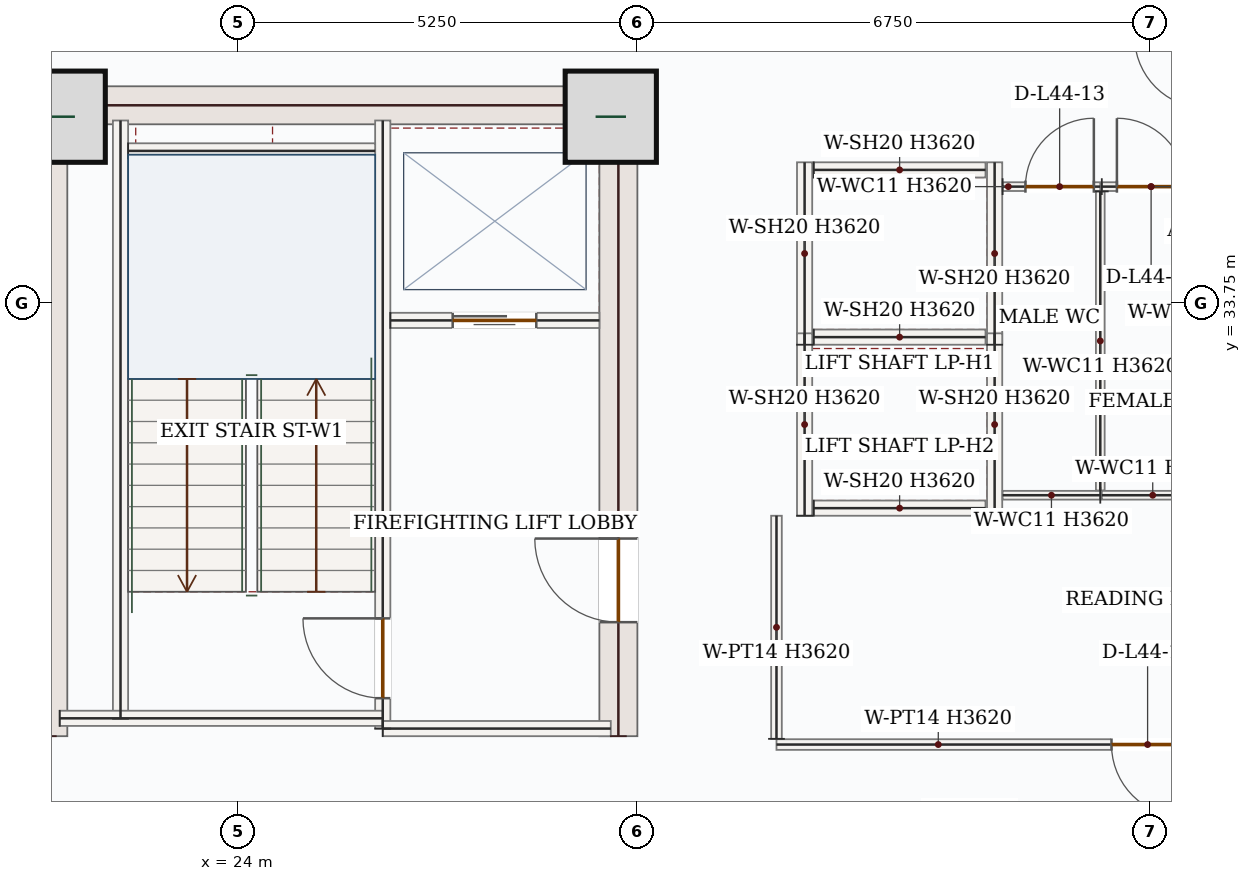
"""IFC4 building model, lengths in metres.
Left out: names, types, materials, properties, quantities, classifications, styles, units other than length and angle.
Written with IfcOpenShell. Run it as: python <this file> out.ifc"""

import sys

from ifc_helpers import new_model, si_unit, direction, frame, frame_2d, origin, origin_2d, place, context, subcontext, project, spatial, rectangle, extrude, source, transform, mapped, element, fill, save


model = new_model("IFC4")
c1 = context("Model", 3, precision=1e-05, world=origin(), true_north=direction((0.0, 1.0)))
c2 = subcontext(c1, "Body", "Model", "MODEL_VIEW")
j1 = project(units=[si_unit("LENGTHUNIT", "METRE"), si_unit("PLANEANGLEUNIT", "RADIAN")], contexts=[c1])
p1 = place(None, origin())
s1 = spatial("IfcSite", under=j1, at=p1, CompositionType="ELEMENT")
p2 = place(p1, origin())
s2 = spatial("IfcBuilding", under=s1, at=p2, CompositionType="ELEMENT")
p3 = place(p2, frame((0.0, 0.0, 190.2)))
s3 = spatial("IfcBuildingStorey", under=s2, at=p3, CompositionType="ELEMENT", Elevation=190.2)
m1 = source(origin(), c2, "Body", "SweptSolid", [
    extrude(rectangle(XDim=8.55, YDim=0.5, at=frame_2d((4.275, 0.0))), origin(), (0.0, 0.0, 1.0), 3.62),
])
p4 = place(p3, frame((21.5, 28.05, 0.0), z_axis=(0.0, 0.0, 1.0), x_axis=(0.0, 1.0, 0.0)))
e1 = element("IfcWall", 1, at=p4, inside=s3, PredefinedType="SHEAR", context=c2, shape_type="MappedRepresentation", body=[
    mapped(m1, transform((0.0, 0.0, 0.0), x_axis=(1.0, 0.0, 0.0), y_axis=(0.0, 1.0, 0.0), z_axis=(0.0, 0.0, 1.0), scale=1.0)),
])
p5 = place(p3, frame((29.0, 28.05, 0.0), z_axis=(0.0, 0.0, 1.0), x_axis=(0.0, 1.0, 0.0)))
e2 = element("IfcWall", 2, at=p5, inside=s3, PredefinedType="SHEAR", context=c2, shape_type="SweptSolid", body=[
    extrude(rectangle(XDim=8.55, YDim=0.5, at=frame_2d((4.275, 0.0))), origin(), (0.0, 0.0, 1.0), 3.62),
])
p6 = place(p5, frame((1.5, 0.0, 0.0)))
e3 = element("IfcOpeningElement", 3, at=p6, cuts=e2, PredefinedType="OPENING", context=c2, shape_type="SweptSolid", body=[
    extrude(rectangle(XDim=1.1, YDim=2.2, at=frame_2d((0.55, 1.1))), frame((0.0, 0.26, 0.0), z_axis=(0.0, -1.0, 0.0), x_axis=(1.0, 0.0, 0.0)), (0.0, 0.0, 1.0), 0.52),
])
m2 = source(origin(), c2, "Body", "SweptSolid", [
    extrude(rectangle(XDim=7.0, YDim=0.5, at=frame_2d((3.5, 0.0))), origin(), (0.0, 0.0, 1.0), 3.62),
])
p7 = place(p3, frame((21.75, 36.35, 0.0), z_axis=(0.0, 0.0, 1.0), x_axis=(1.0, 0.0, 0.0)))
e4 = element("IfcWall", 4, at=p7, inside=s3, PredefinedType="SHEAR", context=c2, shape_type="MappedRepresentation", body=[
    mapped(m2, transform((0.0, 0.0, 0.0), x_axis=(1.0, 0.0, 0.0), y_axis=(0.0, 1.0, 0.0), z_axis=(0.0, 0.0, 1.0), scale=1.0)),
])
m3 = source(origin(), c2, "Body", "SweptSolid", [
    extrude(rectangle(XDim=1.2, YDim=1.2, at=origin_2d()), origin(), (0.0, 0.0, 1.0), 3.9),
])
for number, where, z_axis, x_axis in (
    (5, (21.65, 36.2, 0.0), (0.0, 0.0, 1.0), (1.0, 0.0, 0.0)),
    (6, (28.9, 36.2, 0.0), (0.0, 0.0, 1.0), (1.0, 0.0, 0.0)),
):
    element("IfcColumn", number, at=place(p3, frame(where, z_axis=z_axis, x_axis=x_axis)), inside=s3, PredefinedType="COLUMN", context=c2, shape_type="MappedRepresentation", body=[
        mapped(m3, transform((0.0, 0.0, 0.0), x_axis=(1.0, 0.0, 0.0), y_axis=(0.0, 1.0, 0.0), z_axis=(0.0, 0.0, 1.0), scale=1.0)),
    ])
m4 = source(origin(), c2, "Body", "SweptSolid", [
    extrude(rectangle(XDim=5.258, YDim=0.28, at=frame_2d((2.629, 0.0))), origin(), (0.0, 0.0, 1.0), 3.62),
])
p8 = place(p3, frame((18.94, 35.542, 0.0), z_axis=(0.0, 0.0, 1.0), x_axis=(0.707106781187, 0.707106781187, 0.0)))
e7 = element("IfcWall", 7, at=p8, inside=s3, PredefinedType="SOLIDWALL", context=c2, shape_type="MappedRepresentation", body=[
    mapped(m4, transform((0.0, 0.0, 0.0), x_axis=(1.0, 0.0, 0.0), y_axis=(0.0, 1.0, 0.0), z_axis=(0.0, 0.0, 1.0), scale=1.0)),
])
m5 = source(origin(), c2, "Body", "SweptSolid", [
    extrude(rectangle(XDim=7.87, YDim=0.2, at=frame_2d((3.935, 0.0))), origin(), (0.0, 0.0, 1.0), 3.62),
])
p9 = place(p3, frame((22.45, 28.28, 0.0), z_axis=(0.0, 0.0, 1.0), x_axis=(0.0, 1.0, 0.0)))
e8 = element("IfcWall", 8, at=p9, inside=s3, PredefinedType="SOLIDWALL", context=c2, shape_type="MappedRepresentation", body=[
    mapped(m5, transform((0.0, 0.0, 0.0), x_axis=(1.0, 0.0, 0.0), y_axis=(0.0, 1.0, 0.0), z_axis=(0.0, 0.0, 1.0), scale=1.0)),
])
p10 = place(p3, frame((25.9, 28.15, 0.0), z_axis=(0.0, 0.0, 1.0), x_axis=(0.0, 1.0, 0.0)))
e9 = element("IfcWall", 9, at=p10, inside=s3, PredefinedType="SOLIDWALL", context=c2, shape_type="SweptSolid", body=[
    extrude(rectangle(XDim=8.0, YDim=0.2, at=frame_2d((4.0, 0.0))), origin(), (0.0, 0.0, 1.0), 3.62),
])
p11 = place(p10, frame((0.4, 0.0, 0.0)))
e10 = element("IfcOpeningElement", 10, at=p11, cuts=e9, PredefinedType="OPENING", context=c2, shape_type="SweptSolid", body=[
    extrude(rectangle(XDim=1.05, YDim=2.15, at=frame_2d((0.525, 1.075))), frame((0.0, 0.11, 0.0), z_axis=(0.0, -1.0, 0.0), x_axis=(1.0, 0.0, 0.0)), (0.0, 0.0, 1.0), 0.22),
])
m6 = source(origin(), c2, "Body", "SweptSolid", [
    extrude(rectangle(XDim=4.25, YDim=0.2, at=frame_2d((2.125, 0.0))), origin(), (0.0, 0.0, 1.0), 3.62),
])
p12 = place(p3, frame((21.65, 28.285, 0.0), z_axis=(0.0, 0.0, 1.0), x_axis=(1.0, 0.0, 0.0)))
e11 = element("IfcWall", 11, at=p12, inside=s3, PredefinedType="SOLIDWALL", context=c2, shape_type="MappedRepresentation", body=[
    mapped(m6, transform((0.0, 0.0, 0.0), x_axis=(1.0, 0.0, 0.0), y_axis=(0.0, 1.0, 0.0), z_axis=(0.0, 0.0, 1.0), scale=1.0)),
])
m7 = source(origin(), c2, "Body", "SweptSolid", [
    extrude(rectangle(XDim=3.0, YDim=0.2, at=frame_2d((1.5, 0.0))), origin(), (0.0, 0.0, 1.0), 3.62),
])
p13 = place(p3, frame((25.9, 28.15, 0.0), z_axis=(0.0, 0.0, 1.0), x_axis=(1.0, 0.0, 0.0)))
e12 = element("IfcWall", 12, at=p13, inside=s3, PredefinedType="SOLIDWALL", context=c2, shape_type="MappedRepresentation", body=[
    mapped(m7, transform((0.0, 0.0, 0.0), x_axis=(1.0, 0.0, 0.0), y_axis=(0.0, 1.0, 0.0), z_axis=(0.0, 0.0, 1.0), scale=1.0)),
])
m8 = source(origin(), c2, "Body", "SweptSolid", [
    extrude(rectangle(XDim=3.25, YDim=0.2, at=frame_2d((1.625, 0.0))), origin(), (0.0, 0.0, 1.0), 3.62),
])
p14 = place(p3, frame((22.55, 35.75, 0.0), z_axis=(0.0, 0.0, 1.0), x_axis=(1.0, 0.0, 0.0)))
e13 = element("IfcWall", 13, at=p14, inside=s3, PredefinedType="SOLIDWALL", context=c2, shape_type="MappedRepresentation", body=[
    mapped(m8, transform((0.0, 0.0, 0.0), x_axis=(1.0, 0.0, 0.0), y_axis=(0.0, 1.0, 0.0), z_axis=(0.0, 0.0, 1.0), scale=1.0)),
])
p15 = place(p3, frame((26.0, 33.52, 0.0), z_axis=(0.0, 0.0, 1.0), x_axis=(1.0, 0.0, 0.0)))
e14 = element("IfcWall", 14, at=p15, inside=s3, PredefinedType="SOLIDWALL", context=c2, shape_type="SweptSolid", body=[
    extrude(rectangle(XDim=2.75, YDim=0.2, at=frame_2d((1.375, 0.0))), origin(), (0.0, 0.0, 1.0), 3.62),
])
p16 = place(p15, frame((0.82, 0.0, 0.0)))
e15 = element("IfcOpeningElement", 15, at=p16, cuts=e14, PredefinedType="OPENING", context=c2, shape_type="SweptSolid", body=[
    extrude(rectangle(XDim=1.1, YDim=2.15, at=frame_2d((0.55, 1.075))), frame((0.0, 0.11, 0.0), z_axis=(0.0, -1.0, 0.0), x_axis=(1.0, 0.0, 0.0)), (0.0, 0.0, 1.0), 0.22),
])
m9 = source(origin(), c2, "Body", "SweptSolid", [
    extrude(rectangle(XDim=2.4, YDim=0.2, at=frame_2d((1.2, 0.0))), origin(), (0.0, 0.0, 1.0), 3.62),
])
for number, where, z_axis, x_axis in (
    (16, (31.45, 33.2, 0.0), (0.0, 0.0, 1.0), (0.0, 1.0, 0.0)),
    (17, (33.95, 33.2, 0.0), (0.0, 0.0, 1.0), (0.0, 1.0, 0.0)),
):
    element("IfcWall", number, at=place(p3, frame(where, z_axis=z_axis, x_axis=x_axis)), inside=s3, PredefinedType="SOLIDWALL", context=c2, shape_type="MappedRepresentation", body=[
        mapped(m9, transform((0.0, 0.0, 0.0), x_axis=(1.0, 0.0, 0.0), y_axis=(0.0, 1.0, 0.0), z_axis=(0.0, 0.0, 1.0), scale=1.0)),
    ])
m10 = source(origin(), c2, "Body", "SweptSolid", [
    extrude(rectangle(XDim=2.26, YDim=0.2, at=frame_2d((1.13, 0.0))), origin(), (0.0, 0.0, 1.0), 3.62),
])
for number, where, z_axis, x_axis in (
    (18, (31.57, 33.3, 0.0), (0.0, 0.0, 1.0), (1.0, 0.0, 0.0)),
    (19, (31.57, 35.5, 0.0), (0.0, 0.0, 1.0), (1.0, 0.0, 0.0)),
):
    element("IfcWall", number, at=place(p3, frame(where, z_axis=z_axis, x_axis=x_axis)), inside=s3, PredefinedType="SOLIDWALL", context=c2, shape_type="MappedRepresentation", body=[
        mapped(m10, transform((0.0, 0.0, 0.0), x_axis=(1.0, 0.0, 0.0), y_axis=(0.0, 1.0, 0.0), z_axis=(0.0, 0.0, 1.0), scale=1.0)),
    ])
for number, where, z_axis, x_axis in (
    (20, (31.45, 30.95, 0.0), (0.0, 0.0, 1.0), (0.0, 1.0, 0.0)),
    (21, (33.95, 30.95, 0.0), (0.0, 0.0, 1.0), (0.0, 1.0, 0.0)),
):
    element("IfcWall", number, at=place(p3, frame(where, z_axis=z_axis, x_axis=x_axis)), inside=s3, PredefinedType="SOLIDWALL", context=c2, shape_type="MappedRepresentation", body=[
        mapped(m9, transform((0.0, 0.0, 0.0), x_axis=(1.0, 0.0, 0.0), y_axis=(0.0, 1.0, 0.0), z_axis=(0.0, 0.0, 1.0), scale=1.0)),
    ])
p17 = place(p3, frame((31.57, 31.05, 0.0), z_axis=(0.0, 0.0, 1.0), x_axis=(1.0, 0.0, 0.0)))
e22 = element("IfcWall", 22, at=p17, inside=s3, PredefinedType="SOLIDWALL", context=c2, shape_type="MappedRepresentation", body=[
    mapped(m10, transform((0.0, 0.0, 0.0), x_axis=(1.0, 0.0, 0.0), y_axis=(0.0, 1.0, 0.0), z_axis=(0.0, 0.0, 1.0), scale=1.0)),
])
m11 = source(origin(), c2, "Body", "SweptSolid", [
    extrude(rectangle(XDim=1.285, YDim=0.115, at=frame_2d((0.643, 0.0))), origin(), (0.0, 0.0, 1.0), 3.62),
])
p18 = place(p3, frame((35.34, 31.22, 0.0), z_axis=(0.0, 0.0, 1.0), x_axis=(-1.0, 0.0, 0.0)))
e23 = element("IfcWall", 23, at=p18, inside=s3, PredefinedType="PARTITIONING", context=c2, shape_type="MappedRepresentation", body=[
    mapped(m11, transform((0.0, 0.0, 0.0), x_axis=(1.0, 0.0, 0.0), y_axis=(0.0, 1.0, 0.0), z_axis=(0.0, 0.0, 1.0), scale=1.0)),
])
p19 = place(p3, frame((34.055, 35.28, 0.0), z_axis=(0.0, 0.0, 1.0), x_axis=(1.0, 0.0, 0.0)))
e24 = element("IfcWall", 24, at=p19, inside=s3, PredefinedType="PARTITIONING", context=c2, shape_type="SweptSolid", body=[
    extrude(rectangle(XDim=1.285, YDim=0.115, at=frame_2d((0.643, 0.0))), origin(), (0.0, 0.0, 1.0), 3.62),
])
p20 = place(p19, frame((0.3, 0.0, 0.0)))
e25 = element("IfcOpeningElement", 25, at=p20, cuts=e24, PredefinedType="OPENING", context=c2, shape_type="SweptSolid", body=[
    extrude(rectangle(XDim=0.9, YDim=2.1, at=frame_2d((0.45, 1.05))), frame((0.0, 0.067, 0.0), z_axis=(0.0, -1.0, 0.0), x_axis=(1.0, 0.0, 0.0)), (0.0, 0.0, 1.0), 0.135),
])
m12 = source(origin(), c2, "Body", "SweptSolid", [
    extrude(rectangle(XDim=3.935, YDim=0.115, at=frame_2d((1.968, 0.0))), origin(), (0.0, 0.0, 1.0), 3.62),
])
p21 = place(p3, frame((35.34, 35.218, 0.0), z_axis=(0.0, 0.0, 1.0), x_axis=(0.0, -1.0, 0.0)))
e26 = element("IfcWall", 26, at=p21, inside=s3, PredefinedType="PARTITIONING", context=c2, shape_type="MappedRepresentation", body=[
    mapped(m12, transform((0.0, 0.0, 0.0), x_axis=(1.0, 0.0, 0.0), y_axis=(0.0, 1.0, 0.0), z_axis=(0.0, 0.0, 1.0), scale=1.0)),
])
m13 = source(origin(), c2, "Body", "SweptSolid", [
    extrude(rectangle(XDim=1.34, YDim=0.115, at=frame_2d((0.67, 0.0))), origin(), (0.0, 0.0, 1.0), 3.62),
])
p22 = place(p3, frame((36.7, 31.22, 0.0), z_axis=(0.0, 0.0, 1.0), x_axis=(-1.0, 0.0, 0.0)))
e27 = element("IfcWall", 27, at=p22, inside=s3, PredefinedType="PARTITIONING", context=c2, shape_type="MappedRepresentation", body=[
    mapped(m13, transform((0.0, 0.0, 0.0), x_axis=(1.0, 0.0, 0.0), y_axis=(0.0, 1.0, 0.0), z_axis=(0.0, 0.0, 1.0), scale=1.0)),
])
p23 = place(p3, frame((35.36, 35.28, 0.0), z_axis=(0.0, 0.0, 1.0), x_axis=(1.0, 0.0, 0.0)))
e28 = element("IfcWall", 28, at=p23, inside=s3, PredefinedType="PARTITIONING", context=c2, shape_type="SweptSolid", body=[
    extrude(rectangle(XDim=1.297, YDim=0.115, at=frame_2d((0.649, 0.0))), origin(), (0.0, 0.0, 1.0), 3.62),
])
p24 = place(p23, frame((0.199, 0.0, 0.0)))
e29 = element("IfcOpeningElement", 29, at=p24, cuts=e28, PredefinedType="OPENING", context=c2, shape_type="SweptSolid", body=[
    extrude(rectangle(XDim=0.9, YDim=2.1, at=frame_2d((0.45, 1.05))), frame((0.0, 0.067, 0.0), z_axis=(0.0, -1.0, 0.0), x_axis=(1.0, 0.0, 0.0)), (0.0, 0.0, 1.0), 0.135),
])
p25 = place(p3, frame((40.845, 27.94, 0.0), z_axis=(0.0, 0.0, 1.0), x_axis=(-1.0, 0.0, 0.0)))
e30 = element("IfcWall", 30, at=p25, inside=s3, PredefinedType="PARTITIONING", context=c2, shape_type="SweptSolid", body=[
    extrude(rectangle(XDim=9.765, YDim=0.14, at=frame_2d((4.882, 0.0))), origin(), (0.0, 0.0, 1.0), 3.62),
])
p26 = place(p25, frame((4.407, 0.0, 0.0)))
e31 = element("IfcOpeningElement", 31, at=p26, cuts=e30, PredefinedType="OPENING", context=c2, shape_type="SweptSolid", body=[
    extrude(rectangle(XDim=0.95, YDim=2.15, at=frame_2d((0.475, 1.075))), frame((0.0, 0.08, 0.0), z_axis=(0.0, -1.0, 0.0), x_axis=(1.0, 0.0, 0.0)), (0.0, 0.0, 1.0), 0.16),
])
m14 = source(origin(), c2, "Body", "SweptSolid", [
    extrude(rectangle(XDim=2.935, YDim=0.14, at=frame_2d((1.468, 0.0))), origin(), (0.0, 0.0, 1.0), 3.62),
])
p27 = place(p3, frame((31.08, 28.015, 0.0), z_axis=(0.0, 0.0, 1.0), x_axis=(0.0, 1.0, 0.0)))
e32 = element("IfcWall", 32, at=p27, inside=s3, PredefinedType="PARTITIONING", context=c2, shape_type="MappedRepresentation", body=[
    mapped(m14, transform((0.0, 0.0, 0.0), x_axis=(1.0, 0.0, 0.0), y_axis=(0.0, 1.0, 0.0), z_axis=(0.0, 0.0, 1.0), scale=1.0)),
])
m15 = source(origin(), c2, "Body", "SweptSolid", [
    extrude(rectangle(XDim=1.05, YDim=2.15, at=frame_2d((0.525, 1.075))), frame((0.0, 0.025, 0.0), z_axis=(0.0, -1.0, 0.0), x_axis=(1.0, 0.0, 0.0)), (0.0, 0.0, 1.0), 0.05),
])
p28 = place(p11, origin())
e33 = element("IfcDoor", 33, at=p28, inside=s3, OperationType="SINGLE_SWING_RIGHT", PredefinedType="DOOR", context=c2, shape_type="MappedRepresentation", body=[
    mapped(m15, transform((0.0, 0.0, 0.0), x_axis=(1.0, 0.0, 0.0), y_axis=(0.0, 1.0, 0.0), z_axis=(0.0, 0.0, 1.0), scale=1.0)),
])
fill(e10, e33)
m16 = source(origin(), c2, "Body", "SweptSolid", [
    extrude(rectangle(XDim=1.1, YDim=2.15, at=frame_2d((0.55, 1.075))), frame((0.0, 0.025, 0.0), z_axis=(0.0, -1.0, 0.0), x_axis=(1.0, 0.0, 0.0)), (0.0, 0.0, 1.0), 0.05),
])
p29 = place(p16, origin())
e34 = element("IfcDoor", 34, at=p29, inside=s3, OperationType="DOUBLE_DOOR_SLIDING", PredefinedType="DOOR", context=c2, shape_type="MappedRepresentation", body=[
    mapped(m16, transform((0.0, 0.0, 0.0), x_axis=(1.0, 0.0, 0.0), y_axis=(0.0, 1.0, 0.0), z_axis=(0.0, 0.0, 1.0), scale=1.0)),
])
fill(e15, e34)
m17 = source(origin(), c2, "Body", "SweptSolid", [
    extrude(rectangle(XDim=1.1, YDim=2.2, at=frame_2d((0.55, 1.1))), frame((0.0, 0.025, 0.0), z_axis=(0.0, -1.0, 0.0), x_axis=(1.0, 0.0, 0.0)), (0.0, 0.0, 1.0), 0.05),
])
p30 = place(p6, origin())
e35 = element("IfcDoor", 35, at=p30, inside=s3, OperationType="SINGLE_SWING_RIGHT", PredefinedType="DOOR", context=c2, shape_type="MappedRepresentation", body=[
    mapped(m17, transform((0.0, 0.0, 0.0), x_axis=(1.0, 0.0, 0.0), y_axis=(0.0, 1.0, 0.0), z_axis=(0.0, 0.0, 1.0), scale=1.0)),
])
fill(e3, e35)
m18 = source(origin(), c2, "Body", "SweptSolid", [
    extrude(rectangle(XDim=0.9, YDim=2.1, at=frame_2d((0.45, 1.05))), frame((0.0, 0.025, 0.0), z_axis=(0.0, -1.0, 0.0), x_axis=(1.0, 0.0, 0.0)), (0.0, 0.0, 1.0), 0.05),
])
p31 = place(p20, origin())
e36 = element("IfcDoor", 36, at=p31, inside=s3, OperationType="SINGLE_SWING_RIGHT", PredefinedType="DOOR", context=c2, shape_type="MappedRepresentation", body=[
    mapped(m18, transform((0.0, 0.0, 0.0), x_axis=(1.0, 0.0, 0.0), y_axis=(0.0, 1.0, 0.0), z_axis=(0.0, 0.0, 1.0), scale=1.0)),
])
fill(e25, e36)
p32 = place(p24, origin())
e37 = element("IfcDoor", 37, at=p32, inside=s3, OperationType="SINGLE_SWING_LEFT", PredefinedType="DOOR", context=c2, shape_type="MappedRepresentation", body=[
    mapped(m18, transform((0.0, 0.0, 0.0), x_axis=(1.0, 0.0, 0.0), y_axis=(0.0, 1.0, 0.0), z_axis=(0.0, 0.0, 1.0), scale=1.0)),
])
fill(e29, e37)
m19 = source(origin(), c2, "Body", "SweptSolid", [
    extrude(rectangle(XDim=0.95, YDim=2.15, at=frame_2d((0.475, 1.075))), frame((0.0, 0.025, 0.0), z_axis=(0.0, -1.0, 0.0), x_axis=(1.0, 0.0, 0.0)), (0.0, 0.0, 1.0), 0.05),
])
p33 = place(p26, origin())
e38 = element("IfcDoor", 38, at=p33, inside=s3, OperationType="SINGLE_SWING_LEFT", PredefinedType="DOOR", context=c2, shape_type="MappedRepresentation", body=[
    mapped(m19, transform((0.0, 0.0, 0.0), x_axis=(1.0, 0.0, 0.0), y_axis=(0.0, 1.0, 0.0), z_axis=(0.0, 0.0, 1.0), scale=1.0)),
])
fill(e31, e38)
save(model, sys.argv[1])
